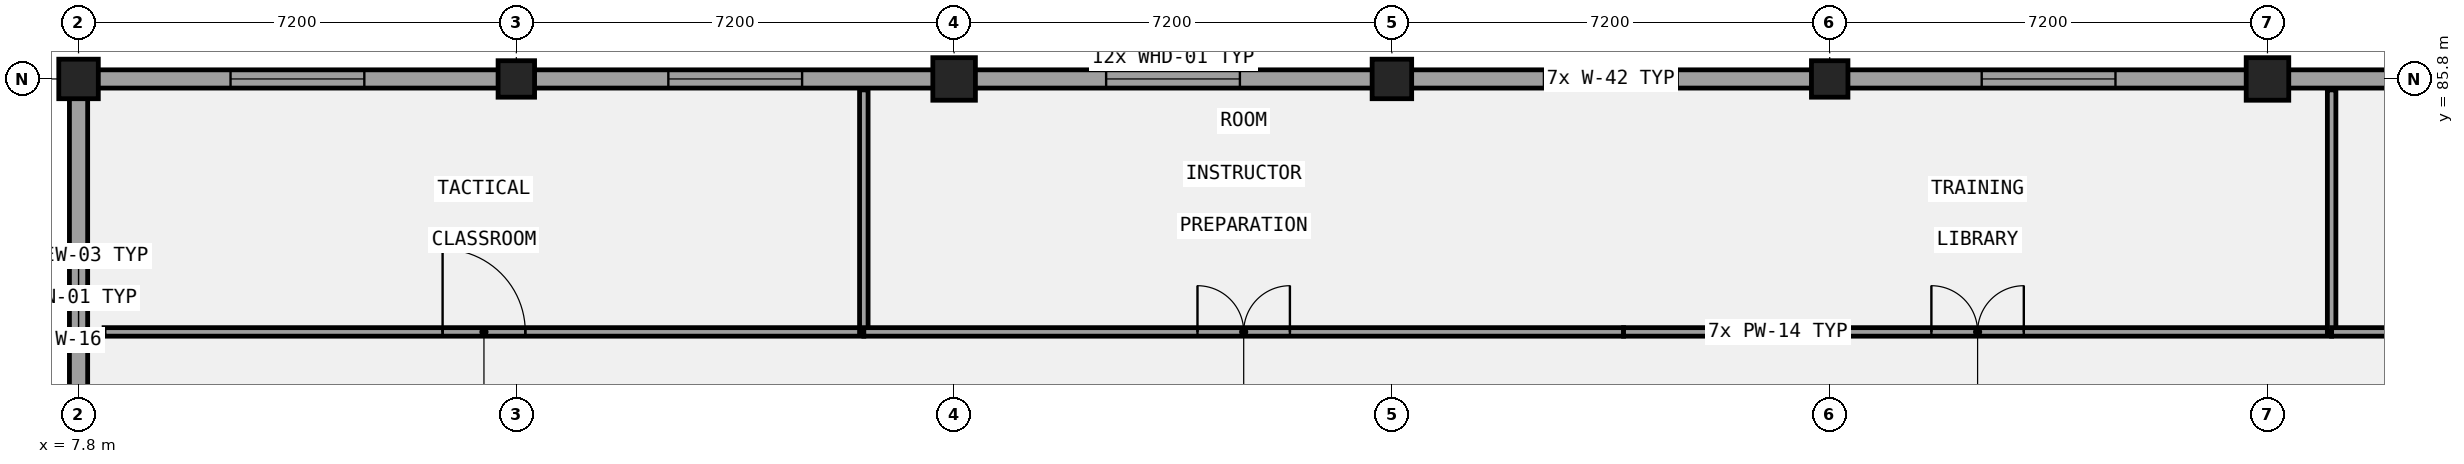
"""IFC4 building model, lengths in metres.
Left out: names, types, materials, properties, quantities, classifications, styles, units other than length and angle.
Written with IfcOpenShell. Run it as: python <this file> out.ifc"""

import sys

from ifc_helpers import new_model, si_unit, direction, frame, frame_2d, origin, origin_2d, place, context, subcontext, project, spatial, rectangle, extrude, element, fill, save


model = new_model("IFC4")
c1 = context("Model", 3, precision=1e-05, world=origin(), true_north=direction((0.0, 1.0)))
c2 = subcontext(c1, "Body", "Model", "MODEL_VIEW")
j1 = project(units=[si_unit("LENGTHUNIT", "METRE"), si_unit("PLANEANGLEUNIT", "RADIAN")], contexts=[c1])
p1 = place(None, origin())
s1 = spatial("IfcSite", under=j1, at=p1, CompositionType="ELEMENT")
p2 = place(p1, origin())
s2 = spatial("IfcBuilding", under=s1, at=p2, CompositionType="ELEMENT")
p3 = place(p2, frame((0.0, 0.0, 13.8)))
s3 = spatial("IfcBuildingStorey", under=s2, at=p3, CompositionType="ELEMENT", Elevation=13.8)
p4 = place(p3, frame((7.8, 85.8, 0.0), z_axis=(0.0, 0.0, 1.0), x_axis=(1.0, 0.0, 0.0)))
e1 = element("IfcColumn", 1, at=p4, inside=s3, PredefinedType="COLUMN", context=c2, shape_type="SweptSolid", body=[
    extrude(rectangle(XDim=0.65, YDim=0.65, at=origin_2d()), origin(), (0.0, 0.0, 1.0), 4.2),
])
p5 = place(p3, frame((15.0, 85.8, 0.0), z_axis=(0.0, 0.0, 1.0), x_axis=(1.0, 0.0, 0.0)))
e2 = element("IfcColumn", 2, at=p5, inside=s3, PredefinedType="COLUMN", context=c2, shape_type="SweptSolid", body=[
    extrude(rectangle(XDim=0.6, YDim=0.6, at=origin_2d()), origin(), (0.0, 0.0, 1.0), 4.2),
])
p6 = place(p3, frame((22.2, 85.8, 0.0), z_axis=(0.0, 0.0, 1.0), x_axis=(1.0, 0.0, 0.0)))
e3 = element("IfcColumn", 3, at=p6, inside=s3, PredefinedType="COLUMN", context=c2, shape_type="SweptSolid", body=[
    extrude(rectangle(XDim=0.7, YDim=0.7, at=origin_2d()), origin(), (0.0, 0.0, 1.0), 4.2),
])
p7 = place(p3, frame((29.4, 85.8, 0.0), z_axis=(0.0, 0.0, 1.0), x_axis=(1.0, 0.0, 0.0)))
e4 = element("IfcColumn", 4, at=p7, inside=s3, PredefinedType="COLUMN", context=c2, shape_type="SweptSolid", body=[
    extrude(rectangle(XDim=0.65, YDim=0.65, at=origin_2d()), origin(), (0.0, 0.0, 1.0), 4.2),
])
p8 = place(p3, frame((36.6, 85.8, 0.0), z_axis=(0.0, 0.0, 1.0), x_axis=(1.0, 0.0, 0.0)))
e5 = element("IfcColumn", 5, at=p8, inside=s3, PredefinedType="COLUMN", context=c2, shape_type="SweptSolid", body=[
    extrude(rectangle(XDim=0.6, YDim=0.6, at=origin_2d()), origin(), (0.0, 0.0, 1.0), 4.2),
])
p9 = place(p3, frame((43.8, 85.8, 0.0), z_axis=(0.0, 0.0, 1.0), x_axis=(1.0, 0.0, 0.0)))
e6 = element("IfcColumn", 6, at=p9, inside=s3, PredefinedType="COLUMN", context=c2, shape_type="SweptSolid", body=[
    extrude(rectangle(XDim=0.7, YDim=0.7, at=origin_2d()), origin(), (0.0, 0.0, 1.0), 4.2),
])
p10 = place(p3, frame((108.75, 85.8, 0.0), z_axis=(0.0, 0.0, 1.0), x_axis=(-1.0, 0.0, 0.0)))
e7 = element("IfcWall", 7, at=p10, inside=s3, PredefinedType="SOLIDWALL", context=c2, shape_type="SweptSolid", body=[
    extrude(rectangle(XDim=101.1, YDim=0.3, at=frame_2d((50.55, 0.0))), origin(), (0.0, 0.0, 1.0), 2.94),
])
p11 = place(p10, frame((96.25, 0.0, 1.0)))
e8 = element("IfcOpeningElement", 8, at=p11, cuts=e7, PredefinedType="OPENING", context=c2, shape_type="SweptSolid", body=[
    extrude(rectangle(XDim=2.2, YDim=1.65, at=frame_2d((1.1, 0.825))), frame((0.0, 0.16, 0.0), z_axis=(0.0, -1.0, 0.0), x_axis=(1.0, 0.0, 0.0)), (0.0, 0.0, 1.0), 0.32),
])
p12 = place(p10, frame((89.05, 0.0, 1.0)))
e9 = element("IfcOpeningElement", 9, at=p12, cuts=e7, PredefinedType="OPENING", context=c2, shape_type="SweptSolid", body=[
    extrude(rectangle(XDim=2.2, YDim=1.65, at=frame_2d((1.1, 0.825))), frame((0.0, 0.16, 0.0), z_axis=(0.0, -1.0, 0.0), x_axis=(1.0, 0.0, 0.0)), (0.0, 0.0, 1.0), 0.32),
])
p13 = place(p10, frame((81.85, 0.0, 1.0)))
e10 = element("IfcOpeningElement", 10, at=p13, cuts=e7, PredefinedType="OPENING", context=c2, shape_type="SweptSolid", body=[
    extrude(rectangle(XDim=2.2, YDim=1.65, at=frame_2d((1.1, 0.825))), frame((0.0, 0.16, 0.0), z_axis=(0.0, -1.0, 0.0), x_axis=(1.0, 0.0, 0.0)), (0.0, 0.0, 1.0), 0.32),
])
p14 = place(p10, frame((74.65, 0.0, 1.0)))
e11 = element("IfcOpeningElement", 11, at=p14, cuts=e7, PredefinedType="OPENING", context=c2, shape_type="SweptSolid", body=[
    extrude(rectangle(XDim=2.2, YDim=1.65, at=frame_2d((1.1, 0.825))), frame((0.0, 0.16, 0.0), z_axis=(0.0, -1.0, 0.0), x_axis=(1.0, 0.0, 0.0)), (0.0, 0.0, 1.0), 0.32),
])
p15 = place(p10, frame((67.45, 0.0, 1.0)))
e12 = element("IfcOpeningElement", 12, at=p15, cuts=e7, PredefinedType="OPENING", context=c2, shape_type="SweptSolid", body=[
    extrude(rectangle(XDim=2.2, YDim=1.65, at=frame_2d((1.1, 0.825))), frame((0.0, 0.16, 0.0), z_axis=(0.0, -1.0, 0.0), x_axis=(1.0, 0.0, 0.0)), (0.0, 0.0, 1.0), 0.32),
])
p16 = place(p10, frame((60.25, 0.0, 1.0)))
e13 = element("IfcOpeningElement", 13, at=p16, cuts=e7, PredefinedType="OPENING", context=c2, shape_type="SweptSolid", body=[
    extrude(rectangle(XDim=2.2, YDim=1.65, at=frame_2d((1.1, 0.825))), frame((0.0, 0.16, 0.0), z_axis=(0.0, -1.0, 0.0), x_axis=(1.0, 0.0, 0.0)), (0.0, 0.0, 1.0), 0.32),
])
p17 = place(p10, frame((53.05, 0.0, 1.0)))
e14 = element("IfcOpeningElement", 14, at=p17, cuts=e7, PredefinedType="OPENING", context=c2, shape_type="SweptSolid", body=[
    extrude(rectangle(XDim=2.2, YDim=1.65, at=frame_2d((1.1, 0.825))), frame((0.0, 0.16, 0.0), z_axis=(0.0, -1.0, 0.0), x_axis=(1.0, 0.0, 0.0)), (0.0, 0.0, 1.0), 0.32),
])
p18 = place(p10, frame((45.85, 0.0, 1.0)))
e15 = element("IfcOpeningElement", 15, at=p18, cuts=e7, PredefinedType="OPENING", context=c2, shape_type="SweptSolid", body=[
    extrude(rectangle(XDim=2.2, YDim=1.65, at=frame_2d((1.1, 0.825))), frame((0.0, 0.16, 0.0), z_axis=(0.0, -1.0, 0.0), x_axis=(1.0, 0.0, 0.0)), (0.0, 0.0, 1.0), 0.32),
])
p19 = place(p10, frame((38.65, 0.0, 1.0)))
e16 = element("IfcOpeningElement", 16, at=p19, cuts=e7, PredefinedType="OPENING", context=c2, shape_type="SweptSolid", body=[
    extrude(rectangle(XDim=2.2, YDim=1.65, at=frame_2d((1.1, 0.825))), frame((0.0, 0.16, 0.0), z_axis=(0.0, -1.0, 0.0), x_axis=(1.0, 0.0, 0.0)), (0.0, 0.0, 1.0), 0.32),
])
p20 = place(p10, frame((31.45, 0.0, 1.0)))
e17 = element("IfcOpeningElement", 17, at=p20, cuts=e7, PredefinedType="OPENING", context=c2, shape_type="SweptSolid", body=[
    extrude(rectangle(XDim=2.2, YDim=1.65, at=frame_2d((1.1, 0.825))), frame((0.0, 0.16, 0.0), z_axis=(0.0, -1.0, 0.0), x_axis=(1.0, 0.0, 0.0)), (0.0, 0.0, 1.0), 0.32),
])
p21 = place(p10, frame((24.25, 0.0, 1.0)))
e18 = element("IfcOpeningElement", 18, at=p21, cuts=e7, PredefinedType="OPENING", context=c2, shape_type="SweptSolid", body=[
    extrude(rectangle(XDim=2.2, YDim=1.65, at=frame_2d((1.1, 0.825))), frame((0.0, 0.16, 0.0), z_axis=(0.0, -1.0, 0.0), x_axis=(1.0, 0.0, 0.0)), (0.0, 0.0, 1.0), 0.32),
])
p22 = place(p10, frame((17.05, 0.0, 1.0)))
e19 = element("IfcOpeningElement", 19, at=p22, cuts=e7, PredefinedType="OPENING", context=c2, shape_type="SweptSolid", body=[
    extrude(rectangle(XDim=2.2, YDim=1.65, at=frame_2d((1.1, 0.825))), frame((0.0, 0.16, 0.0), z_axis=(0.0, -1.0, 0.0), x_axis=(1.0, 0.0, 0.0)), (0.0, 0.0, 1.0), 0.32),
])
p23 = place(p10, frame((9.85, 0.0, 1.0)))
e20 = element("IfcOpeningElement", 20, at=p23, cuts=e7, PredefinedType="OPENING", context=c2, shape_type="SweptSolid", body=[
    extrude(rectangle(XDim=2.2, YDim=1.65, at=frame_2d((1.1, 0.825))), frame((0.0, 0.16, 0.0), z_axis=(0.0, -1.0, 0.0), x_axis=(1.0, 0.0, 0.0)), (0.0, 0.0, 1.0), 0.32),
])
p24 = place(p10, frame((2.65, 0.0, 1.0)))
e21 = element("IfcOpeningElement", 21, at=p24, cuts=e7, PredefinedType="OPENING", context=c2, shape_type="SweptSolid", body=[
    extrude(rectangle(XDim=2.2, YDim=1.65, at=frame_2d((1.1, 0.825))), frame((0.0, 0.16, 0.0), z_axis=(0.0, -1.0, 0.0), x_axis=(1.0, 0.0, 0.0)), (0.0, 0.0, 1.0), 0.32),
])
p25 = place(p3, frame((7.8, 85.65, 0.0), z_axis=(0.0, 0.0, 1.0), x_axis=(0.0, -1.0, 0.0)))
e22 = element("IfcWall", 22, at=p25, inside=s3, PredefinedType="SOLIDWALL", context=c2, shape_type="SweptSolid", body=[
    extrude(rectangle(XDim=6.9, YDim=0.3, at=frame_2d((3.45, 0.0))), origin(), (0.0, 0.0, 1.0), 3.29),
])
p26 = place(p25, frame((2.8, 0.0, 1.0)))
e23 = element("IfcOpeningElement", 23, at=p26, cuts=e22, PredefinedType="OPENING", context=c2, shape_type="SweptSolid", body=[
    extrude(rectangle(XDim=1.3, YDim=1.4, at=frame_2d((0.65, 0.7))), frame((0.0, 0.16, 0.0), z_axis=(0.0, -1.0, 0.0), x_axis=(1.0, 0.0, 0.0)), (0.0, 0.0, 1.0), 0.32),
])
p27 = place(p3, frame((8.22, 81.64, 0.0), z_axis=(0.0, 0.0, 1.0), x_axis=(1.0, 0.0, 0.0)))
e24 = element("IfcWall", 24, at=p27, inside=s3, PredefinedType="PARTITIONING", context=c2, shape_type="SweptSolid", body=[
    extrude(rectangle(XDim=12.495, YDim=0.14, at=frame_2d((6.248, 0.0))), origin(), (0.0, 0.0, 1.0), 3.94),
])
p28 = place(p27, frame((5.567, 0.0, 0.0)))
e25 = element("IfcOpeningElement", 25, at=p28, cuts=e24, PredefinedType="OPENING", context=c2, shape_type="SweptSolid", body=[
    extrude(rectangle(XDim=1.36, YDim=2.35, at=frame_2d((0.68, 1.175))), frame((0.0, 0.08, 0.0), z_axis=(0.0, -1.0, 0.0), x_axis=(1.0, 0.0, 0.0)), (0.0, 0.0, 1.0), 0.16),
])
p29 = place(p3, frame((20.715, 81.64, 0.0), z_axis=(0.0, 0.0, 1.0), x_axis=(0.0, 1.0, 0.0)))
e26 = element("IfcWall", 26, at=p29, inside=s3, PredefinedType="PARTITIONING", context=c2, shape_type="SweptSolid", body=[
    extrude(rectangle(XDim=3.98, YDim=0.14, at=frame_2d((1.99, 0.0))), origin(), (0.0, 0.0, 1.0), 3.94),
])
p30 = place(p3, frame((20.715, 81.64, 0.0), z_axis=(0.0, 0.0, 1.0), x_axis=(1.0, 0.0, 0.0)))
e27 = element("IfcWall", 27, at=p30, inside=s3, PredefinedType="PARTITIONING", context=c2, shape_type="SweptSolid", body=[
    extrude(rectangle(XDim=12.495, YDim=0.14, at=frame_2d((6.248, 0.0))), origin(), (0.0, 0.0, 1.0), 3.94),
])
p31 = place(p30, frame((5.488, 0.0, 0.0)))
e28 = element("IfcOpeningElement", 28, at=p31, cuts=e27, PredefinedType="OPENING", context=c2, shape_type="SweptSolid", body=[
    extrude(rectangle(XDim=1.52, YDim=2.1, at=frame_2d((0.76, 1.05))), frame((0.0, 0.08, 0.0), z_axis=(0.0, -1.0, 0.0), x_axis=(1.0, 0.0, 0.0)), (0.0, 0.0, 1.0), 0.16),
])
p32 = place(p3, frame((33.21, 81.64, 0.0), z_axis=(0.0, 0.0, 1.0), x_axis=(1.0, 0.0, 0.0)))
e29 = element("IfcWall", 29, at=p32, inside=s3, PredefinedType="PARTITIONING", context=c2, shape_type="SweptSolid", body=[
    extrude(rectangle(XDim=11.645, YDim=0.14, at=frame_2d((5.823, 0.0))), origin(), (0.0, 0.0, 1.0), 3.94),
])
p33 = place(p32, frame((5.062, 0.0, 0.0)))
e30 = element("IfcOpeningElement", 30, at=p33, cuts=e29, PredefinedType="OPENING", context=c2, shape_type="SweptSolid", body=[
    extrude(rectangle(XDim=1.52, YDim=2.22, at=frame_2d((0.76, 1.11))), frame((0.0, 0.08, 0.0), z_axis=(0.0, -1.0, 0.0), x_axis=(1.0, 0.0, 0.0)), (0.0, 0.0, 1.0), 0.16),
])
p34 = place(p3, frame((44.855, 81.64, 0.0), z_axis=(0.0, 0.0, 1.0), x_axis=(0.0, 1.0, 0.0)))
e31 = element("IfcWall", 31, at=p34, inside=s3, PredefinedType="PARTITIONING", context=c2, shape_type="SweptSolid", body=[
    extrude(rectangle(XDim=3.98, YDim=0.14, at=frame_2d((1.99, 0.0))), origin(), (0.0, 0.0, 1.0), 3.94),
])
p35 = place(p3, frame((44.855, 81.64, 0.0), z_axis=(0.0, 0.0, 1.0), x_axis=(1.0, 0.0, 0.0)))
e32 = element("IfcWall", 32, at=p35, inside=s3, PredefinedType="PARTITIONING", context=c2, shape_type="SweptSolid", body=[
    extrude(rectangle(XDim=13.345, YDim=0.14, at=frame_2d((6.672, 0.0))), origin(), (0.0, 0.0, 1.0), 3.94),
])
p36 = place(p35, frame((5.913, 0.0, 0.0)))
e33 = element("IfcOpeningElement", 33, at=p36, cuts=e32, PredefinedType="OPENING", context=c2, shape_type="SweptSolid", body=[
    extrude(rectangle(XDim=1.52, YDim=2.35, at=frame_2d((0.76, 1.175))), frame((0.0, 0.08, 0.0), z_axis=(0.0, -1.0, 0.0), x_axis=(1.0, 0.0, 0.0)), (0.0, 0.0, 1.0), 0.16),
])
p37 = place(p11, origin())
e34 = element("IfcWindow", 34, at=p37, inside=s3, PartitioningType="SINGLE_PANEL", PredefinedType="WINDOW", context=c2, shape_type="SweptSolid", body=[
    extrude(rectangle(XDim=2.2, YDim=1.65, at=frame_2d((1.1, 0.825))), frame((0.0, 0.03, 0.0), z_axis=(0.0, -1.0, 0.0), x_axis=(1.0, 0.0, 0.0)), (0.0, 0.0, 1.0), 0.06),
])
fill(e8, e34)
p38 = place(p12, origin())
e35 = element("IfcWindow", 35, at=p38, inside=s3, PartitioningType="SINGLE_PANEL", PredefinedType="WINDOW", context=c2, shape_type="SweptSolid", body=[
    extrude(rectangle(XDim=2.2, YDim=1.65, at=frame_2d((1.1, 0.825))), frame((0.0, 0.03, 0.0), z_axis=(0.0, -1.0, 0.0), x_axis=(1.0, 0.0, 0.0)), (0.0, 0.0, 1.0), 0.06),
])
fill(e9, e35)
p39 = place(p13, origin())
e36 = element("IfcWindow", 36, at=p39, inside=s3, PartitioningType="SINGLE_PANEL", PredefinedType="WINDOW", context=c2, shape_type="SweptSolid", body=[
    extrude(rectangle(XDim=2.2, YDim=1.65, at=frame_2d((1.1, 0.825))), frame((0.0, 0.03, 0.0), z_axis=(0.0, -1.0, 0.0), x_axis=(1.0, 0.0, 0.0)), (0.0, 0.0, 1.0), 0.06),
])
fill(e10, e36)
p40 = place(p14, origin())
e37 = element("IfcWindow", 37, at=p40, inside=s3, PartitioningType="SINGLE_PANEL", PredefinedType="WINDOW", context=c2, shape_type="SweptSolid", body=[
    extrude(rectangle(XDim=2.2, YDim=1.65, at=frame_2d((1.1, 0.825))), frame((0.0, 0.03, 0.0), z_axis=(0.0, -1.0, 0.0), x_axis=(1.0, 0.0, 0.0)), (0.0, 0.0, 1.0), 0.06),
])
fill(e11, e37)
p41 = place(p15, origin())
e38 = element("IfcWindow", 38, at=p41, inside=s3, PartitioningType="SINGLE_PANEL", PredefinedType="WINDOW", context=c2, shape_type="SweptSolid", body=[
    extrude(rectangle(XDim=2.2, YDim=1.65, at=frame_2d((1.1, 0.825))), frame((0.0, 0.03, 0.0), z_axis=(0.0, -1.0, 0.0), x_axis=(1.0, 0.0, 0.0)), (0.0, 0.0, 1.0), 0.06),
])
fill(e12, e38)
p42 = place(p26, origin())
e39 = element("IfcWindow", 39, at=p42, inside=s3, PartitioningType="SINGLE_PANEL", PredefinedType="WINDOW", context=c2, shape_type="SweptSolid", body=[
    extrude(rectangle(XDim=1.3, YDim=1.4, at=frame_2d((0.65, 0.7))), frame((0.0, 0.03, 0.0), z_axis=(0.0, -1.0, 0.0), x_axis=(1.0, 0.0, 0.0)), (0.0, 0.0, 1.0), 0.06),
])
fill(e23, e39)
p43 = place(p28, origin())
e40 = element("IfcDoor", 40, at=p43, inside=s3, OperationType="SINGLE_SWING_LEFT", PredefinedType="DOOR", context=c2, shape_type="SweptSolid", body=[
    extrude(rectangle(XDim=1.36, YDim=2.35, at=frame_2d((0.68, 1.175))), frame((0.0, 0.025, 0.0), z_axis=(0.0, -1.0, 0.0), x_axis=(1.0, 0.0, 0.0)), (0.0, 0.0, 1.0), 0.05),
])
fill(e25, e40)
p44 = place(p31, origin())
e41 = element("IfcDoor", 41, at=p44, inside=s3, OperationType="DOUBLE_DOOR_SINGLE_SWING", PredefinedType="DOOR", context=c2, shape_type="SweptSolid", body=[
    extrude(rectangle(XDim=1.52, YDim=2.1, at=frame_2d((0.76, 1.05))), frame((0.0, 0.025, 0.0), z_axis=(0.0, -1.0, 0.0), x_axis=(1.0, 0.0, 0.0)), (0.0, 0.0, 1.0), 0.05),
])
fill(e28, e41)
p45 = place(p33, origin())
e42 = element("IfcDoor", 42, at=p45, inside=s3, OperationType="DOUBLE_DOOR_SINGLE_SWING", PredefinedType="DOOR", context=c2, shape_type="SweptSolid", body=[
    extrude(rectangle(XDim=1.52, YDim=2.22, at=frame_2d((0.76, 1.11))), frame((0.0, 0.025, 0.0), z_axis=(0.0, -1.0, 0.0), x_axis=(1.0, 0.0, 0.0)), (0.0, 0.0, 1.0), 0.05),
])
fill(e30, e42)
save(model, sys.argv[1])
